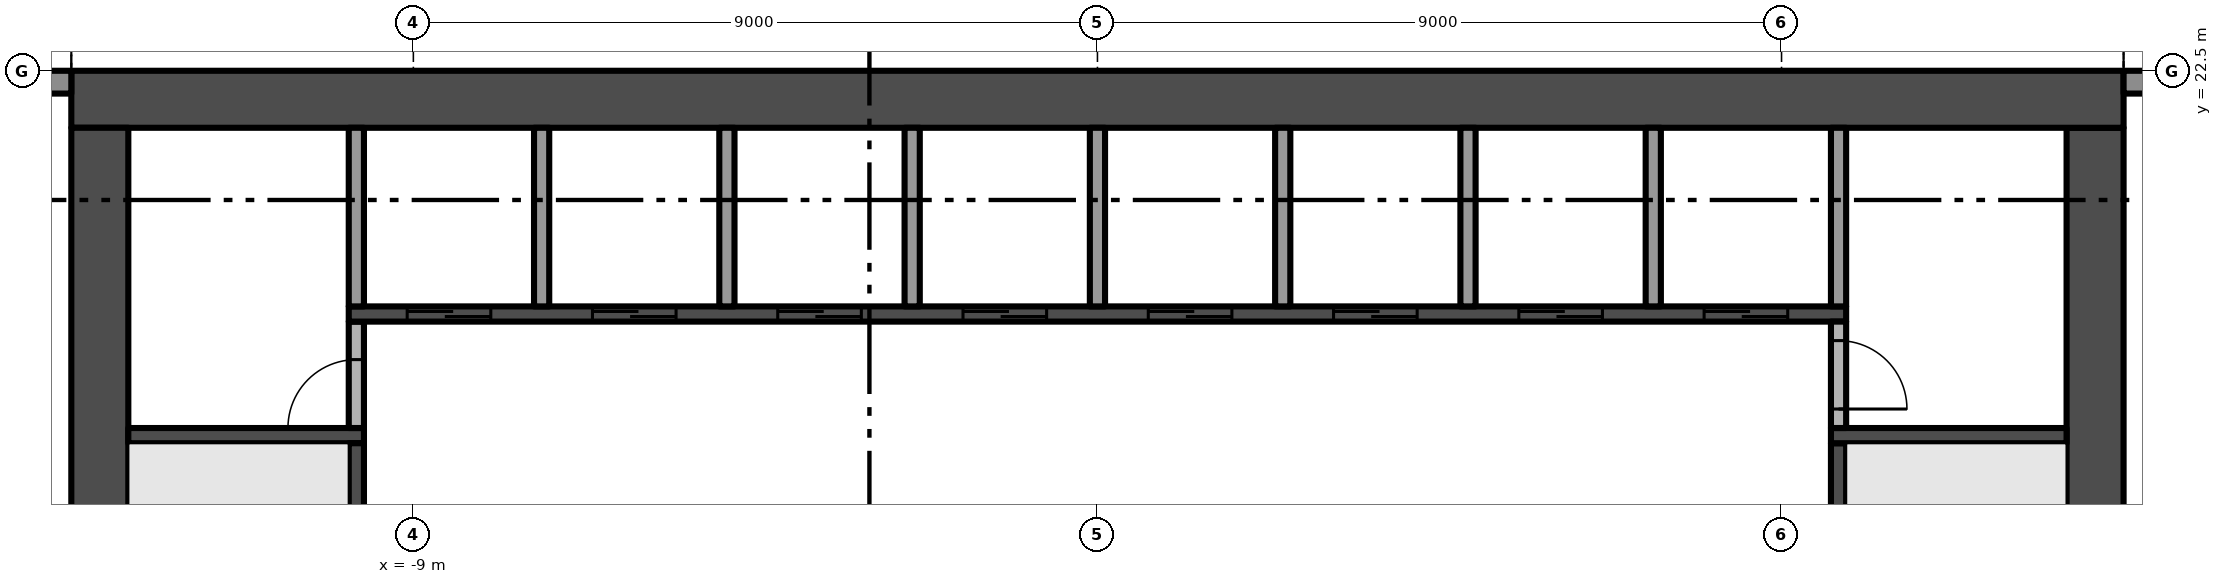
"""IFC4 building model, lengths in metres.
Left out: names, types, materials, properties, quantities, classifications, styles, units other than length and angle.
Written with IfcOpenShell. Run it as: python <this file> out.ifc"""

import sys

from ifc_helpers import new_model, si_unit, direction, frame, frame_2d, origin, place, context, subcontext, project, spatial, rectangle, extrude, element, fill, save


model = new_model("IFC4")
c1 = context("Model", 3, precision=1e-05, world=origin(), true_north=direction((0.0, 1.0)))
c2 = subcontext(c1, "Body", "Model", "MODEL_VIEW")
j1 = project(units=[si_unit("LENGTHUNIT", "METRE"), si_unit("PLANEANGLEUNIT", "RADIAN")], contexts=[c1])
p1 = place(None, origin())
s1 = spatial("IfcSite", under=j1, at=p1, CompositionType="ELEMENT")
p2 = place(p1, origin())
s2 = spatial("IfcBuilding", under=s1, at=p2, CompositionType="ELEMENT")
p3 = place(p2, frame((0.0, 0.0, 120.0)))
s3 = spatial("IfcBuildingStorey", under=s2, at=p3, CompositionType="ELEMENT", Elevation=120.0)
p4 = place(p3, frame((13.125, 5.25, -0.3), z_axis=(0.0, 0.0, 1.0), x_axis=(0.0, 1.0, 0.0)))
e1 = element("IfcWall", 1, at=p4, inside=s3, PredefinedType="SHEAR", context=c2, shape_type="SweptSolid", body=[
    extrude(rectangle(XDim=16.5, YDim=0.75, at=frame_2d((8.25, 0.0))), origin(), (0.0, 0.0, 1.0), 5.0),
])
p5 = place(p4, frame((6.15, 0.0, 0.3)))
e2 = element("IfcOpeningElement", 2, at=p5, cuts=e1, PredefinedType="OPENING", context=c2, shape_type="SweptSolid", body=[
    extrude(rectangle(XDim=1.2, YDim=2.2, at=frame_2d((0.6, 1.1))), frame((0.0, 0.385, 0.0), z_axis=(0.0, -1.0, 0.0), x_axis=(1.0, 0.0, 0.0)), (0.0, 0.0, 1.0), 0.77),
])
p6 = place(p3, frame((13.5, 22.125, -0.3), z_axis=(0.0, 0.0, 1.0), x_axis=(-1.0, 0.0, 0.0)))
e3 = element("IfcWall", 3, at=p6, inside=s3, PredefinedType="SHEAR", context=c2, shape_type="SweptSolid", body=[
    extrude(rectangle(XDim=27.0, YDim=0.75, at=frame_2d((13.5, 0.0))), origin(), (0.0, 0.0, 1.0), 5.0),
])
p7 = place(p3, frame((-13.125, 21.75, -0.3), z_axis=(0.0, 0.0, 1.0), x_axis=(0.0, -1.0, 0.0)))
e4 = element("IfcWall", 4, at=p7, inside=s3, PredefinedType="SHEAR", context=c2, shape_type="SweptSolid", body=[
    extrude(rectangle(XDim=16.5, YDim=0.75, at=frame_2d((8.25, 0.0))), origin(), (0.0, 0.0, 1.0), 5.0),
])
p8 = place(p7, frame((9.15, 0.0, 0.3)))
e5 = element("IfcOpeningElement", 5, at=p8, cuts=e4, PredefinedType="OPENING", context=c2, shape_type="SweptSolid", body=[
    extrude(rectangle(XDim=1.2, YDim=2.2, at=frame_2d((0.6, 1.1))), frame((0.0, 0.385, 0.0), z_axis=(0.0, -1.0, 0.0), x_axis=(1.0, 0.0, 0.0)), (0.0, 0.0, 1.0), 0.77),
])
p9 = place(p3, frame((13.5, 22.35, 0.0), z_axis=(0.0, 0.0, 1.0), x_axis=(1.0, 0.0, 0.0)))
e6 = element("IfcWall", 6, at=p9, inside=s3, PredefinedType="SOLIDWALL", context=c2, shape_type="SweptSolid", body=[
    extrude(rectangle(XDim=3.3, YDim=0.3, at=frame_2d((1.65, 0.0))), origin(), (0.0, 0.0, 1.0), 4.7),
])
p10 = place(p9, frame((0.7, 0.0, 0.0)))
e7 = element("IfcOpeningElement", 7, at=p10, cuts=e6, PredefinedType="OPENING", context=c2, shape_type="SweptSolid", body=[
    extrude(rectangle(XDim=2.3, YDim=2.4, at=frame_2d((1.15, 1.2))), frame((0.0, 0.16, 0.0), z_axis=(0.0, -1.0, 0.0), x_axis=(1.0, 0.0, 0.0)), (0.0, 0.0, 1.0), 0.32),
])
p11 = place(p3, frame((-16.8, 22.35, 0.0), z_axis=(0.0, 0.0, 1.0), x_axis=(1.0, 0.0, 0.0)))
e8 = element("IfcWall", 8, at=p11, inside=s3, PredefinedType="SOLIDWALL", context=c2, shape_type="SweptSolid", body=[
    extrude(rectangle(XDim=3.3, YDim=0.3, at=frame_2d((1.65, 0.0))), origin(), (0.0, 0.0, 1.0), 4.7),
])
p12 = place(p11, frame((0.3, 0.0, 0.0)))
e9 = element("IfcOpeningElement", 9, at=p12, cuts=e8, PredefinedType="OPENING", context=c2, shape_type="SweptSolid", body=[
    extrude(rectangle(XDim=2.3, YDim=2.4, at=frame_2d((1.15, 1.2))), frame((0.0, 0.16, 0.0), z_axis=(0.0, -1.0, 0.0), x_axis=(1.0, 0.0, 0.0)), (0.0, 0.0, 1.0), 0.32),
])
p13 = place(p3, frame((-12.75, 17.7, 0.0), z_axis=(0.0, 0.0, 1.0), x_axis=(1.0, 0.0, 0.0)))
e10 = element("IfcWall", 10, at=p13, inside=s3, PredefinedType="SHEAR", context=c2, shape_type="SweptSolid", body=[
    extrude(rectangle(XDim=3.1, YDim=0.2, at=frame_2d((1.55, 0.0))), origin(), (0.0, 0.0, 1.0), 4.7),
])
p14 = place(p3, frame((-9.75, 16.1, 0.0), z_axis=(0.0, 0.0, 1.0), x_axis=(0.0, 1.0, 0.0)))
e11 = element("IfcWall", 11, at=p14, inside=s3, PredefinedType="SHEAR", context=c2, shape_type="SweptSolid", body=[
    extrude(rectangle(XDim=1.5, YDim=0.2, at=frame_2d((0.75, 0.0))), origin(), (0.0, 0.0, 1.0), 4.7),
])
p15 = place(p3, frame((-9.75, 17.8, 0.0), z_axis=(0.0, 0.0, 1.0), x_axis=(0.0, 1.0, 0.0)))
e12 = element("IfcWall", 12, at=p15, inside=s3, PredefinedType="PARTITIONING", context=c2, shape_type="SweptSolid", body=[
    extrude(rectangle(XDim=1.4, YDim=0.2, at=frame_2d((0.7, 0.0))), origin(), (0.0, 0.0, 1.0), 4.7),
])
p16 = place(p15, origin())
e13 = element("IfcOpeningElement", 13, at=p16, cuts=e12, PredefinedType="OPENING", context=c2, shape_type="SweptSolid", body=[
    extrude(rectangle(XDim=0.9, YDim=2.1, at=frame_2d((0.45, 1.05))), frame((0.0, 0.11, 0.0), z_axis=(0.0, -1.0, 0.0), x_axis=(1.0, 0.0, 0.0)), (0.0, 0.0, 1.0), 0.22),
])
p17 = place(p3, frame((-9.85, 19.3, 0.0), z_axis=(0.0, 0.0, 1.0), x_axis=(1.0, 0.0, 0.0)))
e14 = element("IfcWall", 14, at=p17, inside=s3, PredefinedType="SHEAR", context=c2, shape_type="SweptSolid", body=[
    extrude(rectangle(XDim=19.7, YDim=0.2, at=frame_2d((9.85, 0.0))), origin(), (0.0, 0.0, 1.0), 4.7),
])
p18 = place(p17, frame((0.769, 0.0, 0.0)))
e15 = element("IfcOpeningElement", 15, at=p18, cuts=e14, PredefinedType="OPENING", context=c2, shape_type="SweptSolid", body=[
    extrude(rectangle(XDim=1.1, YDim=2.1, at=frame_2d((0.55, 1.05))), frame((0.0, 0.11, 0.0), z_axis=(0.0, -1.0, 0.0), x_axis=(1.0, 0.0, 0.0)), (0.0, 0.0, 1.0), 0.22),
])
p19 = place(p17, frame((3.206, 0.0, 0.0)))
e16 = element("IfcOpeningElement", 16, at=p19, cuts=e14, PredefinedType="OPENING", context=c2, shape_type="SweptSolid", body=[
    extrude(rectangle(XDim=1.1, YDim=2.1, at=frame_2d((0.55, 1.05))), frame((0.0, 0.11, 0.0), z_axis=(0.0, -1.0, 0.0), x_axis=(1.0, 0.0, 0.0)), (0.0, 0.0, 1.0), 0.22),
])
p20 = place(p17, frame((5.644, 0.0, 0.0)))
e17 = element("IfcOpeningElement", 17, at=p20, cuts=e14, PredefinedType="OPENING", context=c2, shape_type="SweptSolid", body=[
    extrude(rectangle(XDim=1.1, YDim=2.1, at=frame_2d((0.55, 1.05))), frame((0.0, 0.11, 0.0), z_axis=(0.0, -1.0, 0.0), x_axis=(1.0, 0.0, 0.0)), (0.0, 0.0, 1.0), 0.22),
])
p21 = place(p17, frame((8.081, 0.0, 0.0)))
e18 = element("IfcOpeningElement", 18, at=p21, cuts=e14, PredefinedType="OPENING", context=c2, shape_type="SweptSolid", body=[
    extrude(rectangle(XDim=1.1, YDim=2.1, at=frame_2d((0.55, 1.05))), frame((0.0, 0.11, 0.0), z_axis=(0.0, -1.0, 0.0), x_axis=(1.0, 0.0, 0.0)), (0.0, 0.0, 1.0), 0.22),
])
p22 = place(p17, frame((10.519, 0.0, 0.0)))
e19 = element("IfcOpeningElement", 19, at=p22, cuts=e14, PredefinedType="OPENING", context=c2, shape_type="SweptSolid", body=[
    extrude(rectangle(XDim=1.1, YDim=2.1, at=frame_2d((0.55, 1.05))), frame((0.0, 0.11, 0.0), z_axis=(0.0, -1.0, 0.0), x_axis=(1.0, 0.0, 0.0)), (0.0, 0.0, 1.0), 0.22),
])
p23 = place(p17, frame((12.956, 0.0, 0.0)))
e20 = element("IfcOpeningElement", 20, at=p23, cuts=e14, PredefinedType="OPENING", context=c2, shape_type="SweptSolid", body=[
    extrude(rectangle(XDim=1.1, YDim=2.1, at=frame_2d((0.55, 1.05))), frame((0.0, 0.11, 0.0), z_axis=(0.0, -1.0, 0.0), x_axis=(1.0, 0.0, 0.0)), (0.0, 0.0, 1.0), 0.22),
])
p24 = place(p17, frame((15.394, 0.0, 0.0)))
e21 = element("IfcOpeningElement", 21, at=p24, cuts=e14, PredefinedType="OPENING", context=c2, shape_type="SweptSolid", body=[
    extrude(rectangle(XDim=1.1, YDim=2.1, at=frame_2d((0.55, 1.05))), frame((0.0, 0.11, 0.0), z_axis=(0.0, -1.0, 0.0), x_axis=(1.0, 0.0, 0.0)), (0.0, 0.0, 1.0), 0.22),
])
p25 = place(p17, frame((17.831, 0.0, 0.0)))
e22 = element("IfcOpeningElement", 22, at=p25, cuts=e14, PredefinedType="OPENING", context=c2, shape_type="SweptSolid", body=[
    extrude(rectangle(XDim=1.1, YDim=2.1, at=frame_2d((0.55, 1.05))), frame((0.0, 0.11, 0.0), z_axis=(0.0, -1.0, 0.0), x_axis=(1.0, 0.0, 0.0)), (0.0, 0.0, 1.0), 0.22),
])
for number, where, z_axis, x_axis in (
    (23, (-9.75, 19.4, 0.0), (0.0, 0.0, 1.0), (0.0, 1.0, 0.0)),
    (24, (-7.312, 19.4, 0.0), (0.0, 0.0, 1.0), (0.0, 1.0, 0.0)),
    (25, (-4.875, 19.4, 0.0), (0.0, 0.0, 1.0), (0.0, 1.0, 0.0)),
    (26, (-2.438, 19.4, 0.0), (0.0, 0.0, 1.0), (0.0, 1.0, 0.0)),
    (27, (0.0, 19.4, 0.0), (0.0, 0.0, 1.0), (0.0, 1.0, 0.0)),
    (28, (2.438, 19.4, 0.0), (0.0, 0.0, 1.0), (0.0, 1.0, 0.0)),
    (29, (4.875, 19.4, 0.0), (0.0, 0.0, 1.0), (0.0, 1.0, 0.0)),
    (30, (7.312, 19.4, 0.0), (0.0, 0.0, 1.0), (0.0, 1.0, 0.0)),
):
    element("IfcWall", number, at=place(p3, frame(where, z_axis=z_axis, x_axis=x_axis)), inside=s3, PredefinedType="PARTITIONING", context=c2, shape_type="SweptSolid", body=[
        extrude(rectangle(XDim=2.35, YDim=0.2, at=frame_2d((1.175, 0.0))), origin(), (0.0, 0.0, 1.0), 4.7),
    ])
p26 = place(p3, frame((9.75, 16.1, 0.0), z_axis=(0.0, 0.0, 1.0), x_axis=(0.0, 1.0, 0.0)))
e31 = element("IfcWall", 31, at=p26, inside=s3, PredefinedType="SHEAR", context=c2, shape_type="SweptSolid", body=[
    extrude(rectangle(XDim=1.5, YDim=0.2, at=frame_2d((0.75, 0.0))), origin(), (0.0, 0.0, 1.0), 4.7),
])
p27 = place(p3, frame((9.65, 17.7, 0.0), z_axis=(0.0, 0.0, 1.0), x_axis=(1.0, 0.0, 0.0)))
e32 = element("IfcWall", 32, at=p27, inside=s3, PredefinedType="SHEAR", context=c2, shape_type="SweptSolid", body=[
    extrude(rectangle(XDim=3.1, YDim=0.2, at=frame_2d((1.55, 0.0))), origin(), (0.0, 0.0, 1.0), 4.7),
])
p28 = place(p3, frame((9.75, 19.2, 0.0), z_axis=(0.0, 0.0, 1.0), x_axis=(0.0, -1.0, 0.0)))
e33 = element("IfcWall", 33, at=p28, inside=s3, PredefinedType="PARTITIONING", context=c2, shape_type="SweptSolid", body=[
    extrude(rectangle(XDim=1.4, YDim=0.2, at=frame_2d((0.7, 0.0))), origin(), (0.0, 0.0, 1.0), 4.7),
])
p29 = place(p28, frame((0.25, 0.0, 0.0)))
e34 = element("IfcOpeningElement", 34, at=p29, cuts=e33, PredefinedType="OPENING", context=c2, shape_type="SweptSolid", body=[
    extrude(rectangle(XDim=0.9, YDim=2.1, at=frame_2d((0.45, 1.05))), frame((0.0, 0.11, 0.0), z_axis=(0.0, -1.0, 0.0), x_axis=(1.0, 0.0, 0.0)), (0.0, 0.0, 1.0), 0.22),
])
p30 = place(p3, frame((9.75, 19.4, 0.0), z_axis=(0.0, 0.0, 1.0), x_axis=(0.0, 1.0, 0.0)))
e35 = element("IfcWall", 35, at=p30, inside=s3, PredefinedType="PARTITIONING", context=c2, shape_type="SweptSolid", body=[
    extrude(rectangle(XDim=2.35, YDim=0.2, at=frame_2d((1.175, 0.0))), origin(), (0.0, 0.0, 1.0), 4.7),
])
p31 = place(p18, origin())
e36 = element("IfcDoor", 36, at=p31, inside=s3, OperationType="SLIDING_TO_LEFT", PredefinedType="DOOR", context=c2, shape_type="SweptSolid", body=[
    extrude(rectangle(XDim=1.1, YDim=2.1, at=frame_2d((0.55, 1.05))), frame((0.0, 0.025, 0.0), z_axis=(0.0, -1.0, 0.0), x_axis=(1.0, 0.0, 0.0)), (0.0, 0.0, 1.0), 0.05),
])
fill(e15, e36)
p32 = place(p19, origin())
e37 = element("IfcDoor", 37, at=p32, inside=s3, OperationType="SLIDING_TO_LEFT", PredefinedType="DOOR", context=c2, shape_type="SweptSolid", body=[
    extrude(rectangle(XDim=1.1, YDim=2.1, at=frame_2d((0.55, 1.05))), frame((0.0, 0.025, 0.0), z_axis=(0.0, -1.0, 0.0), x_axis=(1.0, 0.0, 0.0)), (0.0, 0.0, 1.0), 0.05),
])
fill(e16, e37)
p33 = place(p20, origin())
e38 = element("IfcDoor", 38, at=p33, inside=s3, OperationType="SLIDING_TO_LEFT", PredefinedType="DOOR", context=c2, shape_type="SweptSolid", body=[
    extrude(rectangle(XDim=1.1, YDim=2.1, at=frame_2d((0.55, 1.05))), frame((0.0, 0.025, 0.0), z_axis=(0.0, -1.0, 0.0), x_axis=(1.0, 0.0, 0.0)), (0.0, 0.0, 1.0), 0.05),
])
fill(e17, e38)
p34 = place(p21, origin())
e39 = element("IfcDoor", 39, at=p34, inside=s3, OperationType="SLIDING_TO_LEFT", PredefinedType="DOOR", context=c2, shape_type="SweptSolid", body=[
    extrude(rectangle(XDim=1.1, YDim=2.1, at=frame_2d((0.55, 1.05))), frame((0.0, 0.025, 0.0), z_axis=(0.0, -1.0, 0.0), x_axis=(1.0, 0.0, 0.0)), (0.0, 0.0, 1.0), 0.05),
])
fill(e18, e39)
p35 = place(p22, origin())
e40 = element("IfcDoor", 40, at=p35, inside=s3, OperationType="SLIDING_TO_RIGHT", PredefinedType="DOOR", context=c2, shape_type="SweptSolid", body=[
    extrude(rectangle(XDim=1.1, YDim=2.1, at=frame_2d((0.55, 1.05))), frame((0.0, 0.025, 0.0), z_axis=(0.0, -1.0, 0.0), x_axis=(1.0, 0.0, 0.0)), (0.0, 0.0, 1.0), 0.05),
])
fill(e19, e40)
p36 = place(p23, origin())
e41 = element("IfcDoor", 41, at=p36, inside=s3, OperationType="SLIDING_TO_RIGHT", PredefinedType="DOOR", context=c2, shape_type="SweptSolid", body=[
    extrude(rectangle(XDim=1.1, YDim=2.1, at=frame_2d((0.55, 1.05))), frame((0.0, 0.025, 0.0), z_axis=(0.0, -1.0, 0.0), x_axis=(1.0, 0.0, 0.0)), (0.0, 0.0, 1.0), 0.05),
])
fill(e20, e41)
p37 = place(p24, origin())
e42 = element("IfcDoor", 42, at=p37, inside=s3, OperationType="SLIDING_TO_RIGHT", PredefinedType="DOOR", context=c2, shape_type="SweptSolid", body=[
    extrude(rectangle(XDim=1.1, YDim=2.1, at=frame_2d((0.55, 1.05))), frame((0.0, 0.025, 0.0), z_axis=(0.0, -1.0, 0.0), x_axis=(1.0, 0.0, 0.0)), (0.0, 0.0, 1.0), 0.05),
])
fill(e21, e42)
p38 = place(p25, origin())
e43 = element("IfcDoor", 43, at=p38, inside=s3, OperationType="SLIDING_TO_RIGHT", PredefinedType="DOOR", context=c2, shape_type="SweptSolid", body=[
    extrude(rectangle(XDim=1.1, YDim=2.1, at=frame_2d((0.55, 1.05))), frame((0.0, 0.025, 0.0), z_axis=(0.0, -1.0, 0.0), x_axis=(1.0, 0.0, 0.0)), (0.0, 0.0, 1.0), 0.05),
])
fill(e22, e43)
p39 = place(p16, origin())
e44 = element("IfcDoor", 44, at=p39, inside=s3, OperationType="SINGLE_SWING_LEFT", PredefinedType="DOOR", context=c2, shape_type="SweptSolid", body=[
    extrude(rectangle(XDim=0.9, YDim=2.1, at=frame_2d((0.45, 1.05))), frame((0.0, 0.025, 0.0), z_axis=(0.0, -1.0, 0.0), x_axis=(1.0, 0.0, 0.0)), (0.0, 0.0, 1.0), 0.05),
])
fill(e13, e44)
p40 = place(p29, origin())
e45 = element("IfcDoor", 45, at=p40, inside=s3, OperationType="SINGLE_SWING_RIGHT", PredefinedType="DOOR", context=c2, shape_type="SweptSolid", body=[
    extrude(rectangle(XDim=0.9, YDim=2.1, at=frame_2d((0.45, 1.05))), frame((0.0, 0.025, 0.0), z_axis=(0.0, -1.0, 0.0), x_axis=(1.0, 0.0, 0.0)), (0.0, 0.0, 1.0), 0.05),
])
fill(e34, e45)
save(model, sys.argv[1])
